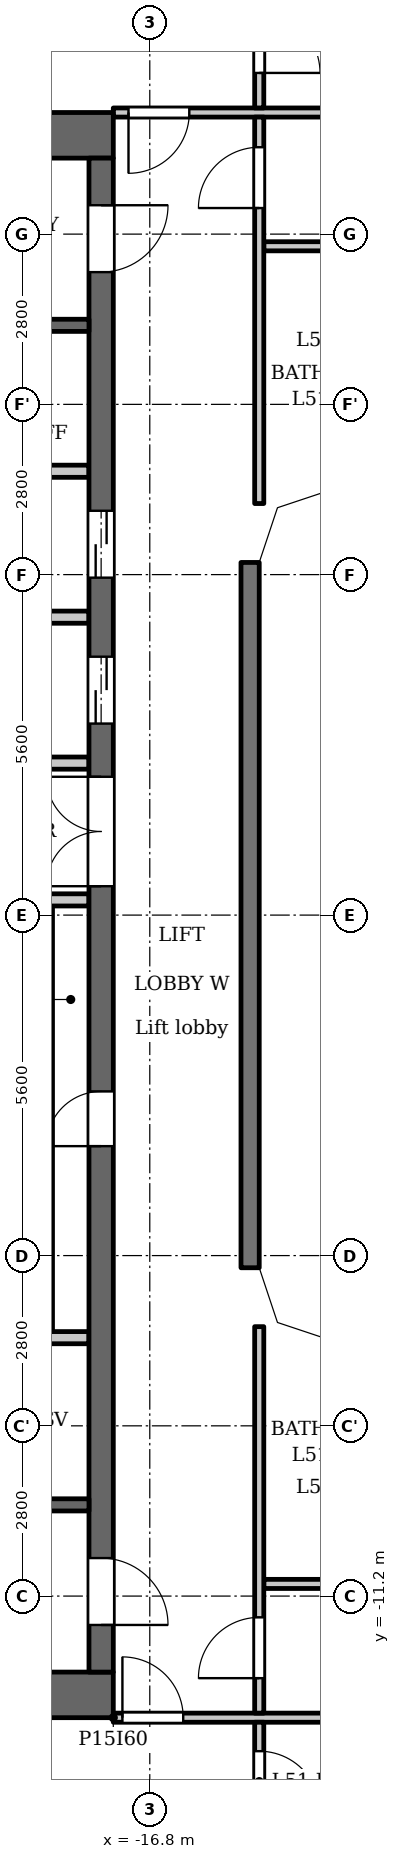
"""IFC4 building model, lengths in metres.
Left out: names, types, materials, properties, quantities, classifications, styles, units other than length and angle.
Written with IfcOpenShell. Run it as: python <this file> out.ifc"""

import sys

from ifc_helpers import new_model, si_unit, direction, frame, frame_2d, origin, place, context, subcontext, project, spatial, polyline, rectangle, outline, extrude, element, fill, save


model = new_model("IFC4")
c1 = context("Model", 3, precision=1e-05, world=origin(), true_north=direction((0.0, 1.0)))
c2 = subcontext(c1, "Body", "Model", "MODEL_VIEW")
j1 = project(units=[si_unit("LENGTHUNIT", "METRE"), si_unit("PLANEANGLEUNIT", "RADIAN")], contexts=[c1])
p1 = place(None, origin())
s1 = spatial("IfcSite", under=j1, at=p1, CompositionType="ELEMENT")
p2 = place(p1, origin())
s2 = spatial("IfcBuilding", under=s1, at=p2, CompositionType="ELEMENT")
p3 = place(p2, frame((0.0, 0.0, 199.4)))
s3 = spatial("IfcBuildingStorey", under=s2, at=p3, CompositionType="ELEMENT", Elevation=199.4)
p4 = place(p3, frame((-15.15, -5.8, 0.0), z_axis=(0.0, 0.0, 1.0), x_axis=(0.0, 1.0, 0.0)))
e1 = element("IfcWall", 1, at=p4, inside=s3, PredefinedType="SOLIDWALL", context=c2, shape_type="SweptSolid", body=[
    extrude(rectangle(XDim=11.6, YDim=0.3, at=frame_2d((5.8, 0.0))), origin(), (0.0, 0.0, 1.0), 3.2),
])
for number, where, z_axis, x_axis in (
    (2, (-17.4, 12.825, 0.0), (0.0, 0.0, 1.0), (-1.0, 0.0, 0.0)),
    (3, (-17.4, -12.825, 0.0), (0.0, 0.0, 1.0), (-1.0, 0.0, 0.0)),
):
    element("IfcWall", number, at=place(p3, frame(where, z_axis=z_axis, x_axis=x_axis)), inside=s3, PredefinedType="SHEAR", context=c2, shape_type="SweptSolid", body=[
        extrude(rectangle(XDim=7.6, YDim=0.75, at=frame_2d((3.8, 0.0))), origin(), (0.0, 0.0, 1.0), 3.2),
    ])
p5 = place(p3, frame((-17.6, -12.45, 0.0), z_axis=(0.0, 0.0, 1.0), x_axis=(0.0, 1.0, 0.0)))
e4 = element("IfcWall", 4, at=p5, inside=s3, PredefinedType="SHEAR", context=c2, shape_type="SweptSolid", body=[
    extrude(rectangle(XDim=24.9, YDim=0.4, at=frame_2d((12.45, 0.0))), origin(), (0.0, 0.0, 1.0), 3.2),
])
p6 = place(p5, frame((8.65, 0.0, 0.0)))
e5 = element("IfcOpeningElement", 5, at=p6, cuts=e4, PredefinedType="OPENING", context=c2, shape_type="SweptSolid", body=[
    extrude(rectangle(XDim=0.9, YDim=2.1, at=frame_2d((0.45, 1.05))), frame((0.0, 0.21, 0.0), z_axis=(0.0, -1.0, 0.0), x_axis=(1.0, 0.0, 0.0)), (0.0, 0.0, 1.0), 0.42),
])
p7 = place(p5, frame((15.6, 0.0, 0.0)))
e6 = element("IfcOpeningElement", 6, at=p7, cuts=e4, PredefinedType="OPENING", context=c2, shape_type="SweptSolid", body=[
    extrude(rectangle(XDim=1.1, YDim=2.1, at=frame_2d((0.55, 1.05))), frame((0.0, 0.21, 0.0), z_axis=(0.0, -1.0, 0.0), x_axis=(1.0, 0.0, 0.0)), (0.0, 0.0, 1.0), 0.42),
])
p8 = place(p5, frame((18.0, 0.0, 0.0)))
e7 = element("IfcOpeningElement", 7, at=p8, cuts=e4, PredefinedType="OPENING", context=c2, shape_type="SweptSolid", body=[
    extrude(rectangle(XDim=1.1, YDim=2.1, at=frame_2d((0.55, 1.05))), frame((0.0, 0.21, 0.0), z_axis=(0.0, -1.0, 0.0), x_axis=(1.0, 0.0, 0.0)), (0.0, 0.0, 1.0), 0.42),
])
p9 = place(p5, frame((23.025, 0.0, 0.0)))
e8 = element("IfcOpeningElement", 8, at=p9, cuts=e4, PredefinedType="OPENING", context=c2, shape_type="SweptSolid", body=[
    extrude(rectangle(XDim=1.1, YDim=2.1, at=frame_2d((0.55, 1.05))), frame((0.0, 0.21, 0.0), z_axis=(0.0, -1.0, 0.0), x_axis=(1.0, 0.0, 0.0)), (0.0, 0.0, 1.0), 0.42),
])
p10 = place(p5, frame((0.775, 0.0, 0.0)))
e9 = element("IfcOpeningElement", 9, at=p10, cuts=e4, PredefinedType="OPENING", context=c2, shape_type="SweptSolid", body=[
    extrude(rectangle(XDim=1.1, YDim=2.1, at=frame_2d((0.55, 1.05))), frame((0.0, 0.21, 0.0), z_axis=(0.0, -1.0, 0.0), x_axis=(1.0, 0.0, 0.0)), (0.0, 0.0, 1.0), 0.42),
])
p11 = place(p5, frame((12.925, 0.0, 0.0)))
e10 = element("IfcOpeningElement", 10, at=p11, cuts=e4, PredefinedType="OPENING", context=c2, shape_type="SweptSolid", body=[
    extrude(rectangle(XDim=1.8, YDim=2.1, at=frame_2d((0.9, 1.05))), frame((0.0, 0.21, 0.0), z_axis=(0.0, -1.0, 0.0), x_axis=(1.0, 0.0, 0.0)), (0.0, 0.0, 1.0), 0.42),
])
p12 = place(p3, frame((-17.8, -9.7, 0.0), z_axis=(0.0, 0.0, 1.0), x_axis=(-1.0, 0.0, 0.0)))
e11 = element("IfcWall", 11, at=p12, inside=s3, PredefinedType="SHEAR", context=c2, shape_type="SweptSolid", body=[
    extrude(rectangle(XDim=5.65, YDim=0.2, at=frame_2d((2.825, 0.0))), origin(), (0.0, 0.0, 1.0), 3.2),
])
p13 = place(p12, frame((0.85, 0.0, 0.0)))
e12 = element("IfcOpeningElement", 12, at=p13, cuts=e11, PredefinedType="OPENING", context=c2, shape_type="SweptSolid", body=[
    extrude(rectangle(XDim=1.1, YDim=2.1, at=frame_2d((0.55, 1.05))), frame((0.0, 0.11, 0.0), z_axis=(0.0, -1.0, 0.0), x_axis=(1.0, 0.0, 0.0)), (0.0, 0.0, 1.0), 0.22),
])
p14 = place(p12, frame((3.75, 0.0, 0.0)))
e13 = element("IfcOpeningElement", 13, at=p14, cuts=e11, PredefinedType="OPENING", context=c2, shape_type="SweptSolid", body=[
    extrude(rectangle(XDim=1.1, YDim=2.1, at=frame_2d((0.55, 1.05))), frame((0.0, 0.11, 0.0), z_axis=(0.0, -1.0, 0.0), x_axis=(1.0, 0.0, 0.0)), (0.0, 0.0, 1.0), 0.22),
])
p15 = place(p3, frame((-17.8, -6.95, 0.0), z_axis=(0.0, 0.0, 1.0), x_axis=(-1.0, 0.0, 0.0)))
e14 = element("IfcWall", 14, at=p15, inside=s3, PredefinedType="PARTITIONING", context=c2, shape_type="SweptSolid", body=[
    extrude(rectangle(XDim=2.8, YDim=0.2, at=frame_2d((1.4, 0.0))), origin(), (0.0, 0.0, 1.0), 3.2),
])
p16 = place(p3, frame((-17.8, 0.25, 0.0), z_axis=(0.0, 0.0, 1.0), x_axis=(-1.0, 0.0, 0.0)))
e15 = element("IfcWall", 15, at=p16, inside=s3, PredefinedType="PARTITIONING", context=c2, shape_type="SweptSolid", body=[
    extrude(rectangle(XDim=3.0, YDim=0.2, at=frame_2d((1.5, 0.0))), origin(), (0.0, 0.0, 1.0), 3.2),
])
p17 = place(p16, frame((1.35, 0.0, 0.0)))
e16 = element("IfcOpeningElement", 16, at=p17, cuts=e15, PredefinedType="OPENING", context=c2, shape_type="SweptSolid", body=[
    extrude(rectangle(XDim=0.9, YDim=2.1, at=frame_2d((0.45, 1.05))), frame((0.0, 0.11, 0.0), z_axis=(0.0, -1.0, 0.0), x_axis=(1.0, 0.0, 0.0)), (0.0, 0.0, 1.0), 0.22),
])
p18 = place(p3, frame((-17.8, 2.5, 0.0), z_axis=(0.0, 0.0, 1.0), x_axis=(-1.0, 0.0, 0.0)))
e17 = element("IfcWall", 17, at=p18, inside=s3, PredefinedType="PARTITIONING", context=c2, shape_type="SweptSolid", body=[
    extrude(rectangle(XDim=3.0, YDim=0.2, at=frame_2d((1.5, 0.0))), origin(), (0.0, 0.0, 1.0), 3.2),
])
for number, where, z_axis, x_axis in (
    (18, (-17.8, 4.9, 0.0), (0.0, 0.0, 1.0), (-1.0, 0.0, 0.0)),
    (19, (-17.8, 7.3, 0.0), (0.0, 0.0, 1.0), (-1.0, 0.0, 0.0)),
):
    element("IfcWall", number, at=place(p3, frame(where, z_axis=z_axis, x_axis=x_axis)), inside=s3, PredefinedType="PARTITIONING", context=c2, shape_type="SweptSolid", body=[
        extrude(rectangle(XDim=2.8, YDim=0.2, at=frame_2d((1.4, 0.0))), origin(), (0.0, 0.0, 1.0), 3.2),
    ])
p19 = place(p3, frame((-17.8, 9.7, 0.0), z_axis=(0.0, 0.0, 1.0), x_axis=(-1.0, 0.0, 0.0)))
e20 = element("IfcWall", 20, at=p19, inside=s3, PredefinedType="SHEAR", context=c2, shape_type="SweptSolid", body=[
    extrude(rectangle(XDim=5.65, YDim=0.2, at=frame_2d((2.825, 0.0))), origin(), (0.0, 0.0, 1.0), 3.2),
])
p20 = place(p19, frame((0.85, 0.0, 0.0)))
e21 = element("IfcOpeningElement", 21, at=p20, cuts=e20, PredefinedType="OPENING", context=c2, shape_type="SweptSolid", body=[
    extrude(rectangle(XDim=1.1, YDim=2.1, at=frame_2d((0.55, 1.05))), frame((0.0, 0.11, 0.0), z_axis=(0.0, -1.0, 0.0), x_axis=(1.0, 0.0, 0.0)), (0.0, 0.0, 1.0), 0.22),
])
p21 = place(p19, frame((3.75, 0.0, 0.0)))
e22 = element("IfcOpeningElement", 22, at=p21, cuts=e20, PredefinedType="OPENING", context=c2, shape_type="SweptSolid", body=[
    extrude(rectangle(XDim=1.1, YDim=2.1, at=frame_2d((0.55, 1.05))), frame((0.0, 0.11, 0.0), z_axis=(0.0, -1.0, 0.0), x_axis=(1.0, 0.0, 0.0)), (0.0, 0.0, 1.0), 0.22),
])
p22 = place(p3, frame((-17.4, -13.2, 0.0), z_axis=(0.0, 0.0, 1.0), x_axis=(1.0, 0.0, 0.0)))
e23 = element("IfcWall", 23, at=p22, inside=s3, PredefinedType="PARTITIONING", context=c2, shape_type="SweptSolid", body=[
    extrude(rectangle(XDim=34.8, YDim=0.15, at=frame_2d((17.4, 0.0))), origin(), (0.0, 0.0, 1.0), 3.2),
])
p23 = place(p22, frame((0.15, 0.0, 0.0)))
e24 = element("IfcOpeningElement", 24, at=p23, cuts=e23, PredefinedType="OPENING", context=c2, shape_type="SweptSolid", body=[
    extrude(rectangle(XDim=1.0, YDim=2.1, at=frame_2d((0.5, 1.05))), frame((0.0, 0.085, 0.0), z_axis=(0.0, -1.0, 0.0), x_axis=(1.0, 0.0, 0.0)), (0.0, 0.0, 1.0), 0.17),
])
p24 = place(p22, frame((33.55, 0.0, 0.0)))
e25 = element("IfcOpeningElement", 25, at=p24, cuts=e23, PredefinedType="OPENING", context=c2, shape_type="SweptSolid", body=[
    extrude(rectangle(XDim=1.0, YDim=2.1, at=frame_2d((0.5, 1.05))), frame((0.0, 0.085, 0.0), z_axis=(0.0, -1.0, 0.0), x_axis=(1.0, 0.0, 0.0)), (0.0, 0.0, 1.0), 0.17),
])
p25 = place(p3, frame((-14.925, -11.0, 0.0), z_axis=(0.0, 0.0, 1.0), x_axis=(1.0, 0.0, 0.0)))
e26 = element("IfcWall", 26, at=p25, inside=s3, PredefinedType="PARTITIONING", context=c2, shape_type="SweptSolid", body=[
    extrude(rectangle(XDim=29.85, YDim=0.15, at=frame_2d((14.925, 0.0))), origin(), (0.0, 0.0, 1.0), 3.2),
])
p26 = place(p25, frame((2.575, 0.0, 0.0)))
e27 = element("IfcOpeningElement", 27, at=p26, cuts=e26, PredefinedType="OPENING", context=c2, shape_type="SweptSolid", body=[
    extrude(rectangle(XDim=1.0, YDim=2.1, at=frame_2d((0.5, 1.05))), frame((0.0, 0.085, 0.0), z_axis=(0.0, -1.0, 0.0), x_axis=(1.0, 0.0, 0.0)), (0.0, 0.0, 1.0), 0.17),
])
p27 = place(p25, frame((26.375, 0.0, 0.0)))
e28 = element("IfcOpeningElement", 28, at=p27, cuts=e26, PredefinedType="OPENING", context=c2, shape_type="SweptSolid", body=[
    extrude(rectangle(XDim=1.0, YDim=2.1, at=frame_2d((0.5, 1.05))), frame((0.0, 0.085, 0.0), z_axis=(0.0, -1.0, 0.0), x_axis=(1.0, 0.0, 0.0)), (0.0, 0.0, 1.0), 0.17),
])
p28 = place(p3, frame((-14.925, 11.0, 0.0), z_axis=(0.0, 0.0, 1.0), x_axis=(1.0, 0.0, 0.0)))
e29 = element("IfcWall", 29, at=p28, inside=s3, PredefinedType="PARTITIONING", context=c2, shape_type="SweptSolid", body=[
    extrude(rectangle(XDim=29.85, YDim=0.15, at=frame_2d((14.925, 0.0))), origin(), (0.0, 0.0, 1.0), 3.2),
])
p29 = place(p28, frame((2.475, 0.0, 0.0)))
e30 = element("IfcOpeningElement", 30, at=p29, cuts=e29, PredefinedType="OPENING", context=c2, shape_type="SweptSolid", body=[
    extrude(rectangle(XDim=1.0, YDim=2.1, at=frame_2d((0.5, 1.05))), frame((0.0, 0.085, 0.0), z_axis=(0.0, -1.0, 0.0), x_axis=(1.0, 0.0, 0.0)), (0.0, 0.0, 1.0), 0.17),
])
p30 = place(p28, frame((17.975, 0.0, 0.0)))
e31 = element("IfcOpeningElement", 31, at=p30, cuts=e29, PredefinedType="OPENING", context=c2, shape_type="SweptSolid", body=[
    extrude(rectangle(XDim=1.0, YDim=2.1, at=frame_2d((0.5, 1.05))), frame((0.0, 0.085, 0.0), z_axis=(0.0, -1.0, 0.0), x_axis=(1.0, 0.0, 0.0)), (0.0, 0.0, 1.0), 0.17),
])
p31 = place(p3, frame((-17.4, 13.2, 0.0), z_axis=(0.0, 0.0, 1.0), x_axis=(1.0, 0.0, 0.0)))
e32 = element("IfcWall", 32, at=p31, inside=s3, PredefinedType="PARTITIONING", context=c2, shape_type="SweptSolid", body=[
    extrude(rectangle(XDim=34.8, YDim=0.15, at=frame_2d((17.4, 0.0))), origin(), (0.0, 0.0, 1.0), 3.2),
])
p32 = place(p31, frame((0.25, 0.0, 0.0)))
e33 = element("IfcOpeningElement", 33, at=p32, cuts=e32, PredefinedType="OPENING", context=c2, shape_type="SweptSolid", body=[
    extrude(rectangle(XDim=1.0, YDim=2.1, at=frame_2d((0.5, 1.05))), frame((0.0, 0.085, 0.0), z_axis=(0.0, -1.0, 0.0), x_axis=(1.0, 0.0, 0.0)), (0.0, 0.0, 1.0), 0.17),
])
p33 = place(p31, frame((33.65, 0.0, 0.0)))
e34 = element("IfcOpeningElement", 34, at=p33, cuts=e32, PredefinedType="OPENING", context=c2, shape_type="SweptSolid", body=[
    extrude(rectangle(XDim=1.0, YDim=2.1, at=frame_2d((0.5, 1.05))), frame((0.0, 0.085, 0.0), z_axis=(0.0, -1.0, 0.0), x_axis=(1.0, 0.0, 0.0)), (0.0, 0.0, 1.0), 0.17),
])
p34 = place(p3, frame((-15.0, -15.325, 0.0), z_axis=(0.0, 0.0, 1.0), x_axis=(0.0, 1.0, 0.0)))
e35 = element("IfcWall", 35, at=p34, inside=s3, PredefinedType="PARTITIONING", context=c2, shape_type="SweptSolid", body=[
    extrude(rectangle(XDim=2.05, YDim=0.15, at=frame_2d((1.025, 0.0))), origin(), (0.0, 0.0, 1.0), 3.2),
])
p35 = place(p34, frame((0.574, 0.0, 0.0)))
e36 = element("IfcOpeningElement", 36, at=p35, cuts=e35, PredefinedType="OPENING", context=c2, shape_type="SweptSolid", body=[
    extrude(rectangle(XDim=1.0, YDim=2.1, at=frame_2d((0.5, 1.05))), frame((0.0, 0.085, 0.0), z_axis=(0.0, -1.0, 0.0), x_axis=(1.0, 0.0, 0.0)), (0.0, 0.0, 1.0), 0.17),
])
p36 = place(p3, frame((-15.0, -13.125, 0.0), z_axis=(0.0, 0.0, 1.0), x_axis=(0.0, 1.0, 0.0)))
e37 = element("IfcWall", 37, at=p36, inside=s3, PredefinedType="PARTITIONING", context=c2, shape_type="SweptSolid", body=[
    extrude(rectangle(XDim=6.356, YDim=0.15, at=frame_2d((3.178, 0.0))), origin(), (0.0, 0.0, 1.0), 3.2),
])
p37 = place(p36, frame((0.575, 0.0, 0.0)))
e38 = element("IfcOpeningElement", 38, at=p37, cuts=e37, PredefinedType="OPENING", context=c2, shape_type="SweptSolid", body=[
    extrude(rectangle(XDim=1.0, YDim=2.1, at=frame_2d((0.5, 1.05))), frame((0.0, 0.085, 0.0), z_axis=(0.0, -1.0, 0.0), x_axis=(1.0, 0.0, 0.0)), (0.0, 0.0, 1.0), 0.17),
])
p38 = place(p3, frame((-15.0, 6.769, 0.0), z_axis=(0.0, 0.0, 1.0), x_axis=(0.0, 1.0, 0.0)))
e39 = element("IfcWall", 39, at=p38, inside=s3, PredefinedType="PARTITIONING", context=c2, shape_type="SweptSolid", body=[
    extrude(rectangle(XDim=6.356, YDim=0.15, at=frame_2d((3.178, 0.0))), origin(), (0.0, 0.0, 1.0), 3.2),
])
p39 = place(p38, frame((4.86, 0.0, 0.0)))
e40 = element("IfcOpeningElement", 40, at=p39, cuts=e39, PredefinedType="OPENING", context=c2, shape_type="SweptSolid", body=[
    extrude(rectangle(XDim=1.0, YDim=2.1, at=frame_2d((0.5, 1.05))), frame((0.0, 0.085, 0.0), z_axis=(0.0, -1.0, 0.0), x_axis=(1.0, 0.0, 0.0)), (0.0, 0.0, 1.0), 0.17),
])
p40 = place(p3, frame((-15.0, 13.275, 0.0), z_axis=(0.0, 0.0, 1.0), x_axis=(0.0, 1.0, 0.0)))
e41 = element("IfcWall", 41, at=p40, inside=s3, PredefinedType="PARTITIONING", context=c2, shape_type="SweptSolid", body=[
    extrude(rectangle(XDim=2.05, YDim=0.15, at=frame_2d((1.025, 0.0))), origin(), (0.0, 0.0, 1.0), 3.2),
])
p41 = place(p40, frame((0.576, 0.0, 0.0)))
e42 = element("IfcOpeningElement", 42, at=p41, cuts=e41, PredefinedType="OPENING", context=c2, shape_type="SweptSolid", body=[
    extrude(rectangle(XDim=1.0, YDim=2.1, at=frame_2d((0.5, 1.05))), frame((0.0, 0.085, 0.0), z_axis=(0.0, -1.0, 0.0), x_axis=(1.0, 0.0, 0.0)), (0.0, 0.0, 1.0), 0.17),
])
p42 = place(p3, origin())
e43 = element("IfcWall", 43, at=p42, inside=s3, PredefinedType="SOLIDWALL", context=c2, shape_type="SweptSolid", body=[
    extrude(outline(polyline([(-13.849, 7.3), (-14.937, 6.937), (-15.3, 5.849), (-15.3, 5.8), (-15.0, 5.8), (-14.7, 6.7), (-13.8, 7.0), (-13.8, 7.3), (-13.849, 7.3)])), origin(), (0.0, 0.0, 1.0), 3.2),
])
e44 = element("IfcWall", 44, at=p42, inside=s3, PredefinedType="SOLIDWALL", context=c2, shape_type="SweptSolid", body=[
    extrude(outline(polyline([(-14.937, -6.937), (-13.849, -7.3), (-13.8, -7.3), (-13.8, -7.0), (-14.7, -6.7), (-15.0, -5.8), (-15.3, -5.8), (-15.3, -5.849), (-14.937, -6.937)])), origin(), (0.0, 0.0, 1.0), 3.2),
])
p43 = place(p6, origin())
e45 = element("IfcDoor", 45, at=p43, inside=s3, OperationType="SINGLE_SWING_RIGHT", PredefinedType="DOOR", context=c2, shape_type="SweptSolid", body=[
    extrude(rectangle(XDim=0.9, YDim=2.1, at=frame_2d((0.45, 1.05))), frame((0.0, 0.025, 0.0), z_axis=(0.0, -1.0, 0.0), x_axis=(1.0, 0.0, 0.0)), (0.0, 0.0, 1.0), 0.05),
])
fill(e5, e45)
p44 = place(p7, origin())
e46 = element("IfcDoor", 46, at=p44, inside=s3, OperationType="DOUBLE_DOOR_SLIDING", PredefinedType="DOOR", context=c2, shape_type="SweptSolid", body=[
    extrude(rectangle(XDim=1.1, YDim=2.1, at=frame_2d((0.55, 1.05))), frame((0.0, 0.025, 0.0), z_axis=(0.0, -1.0, 0.0), x_axis=(1.0, 0.0, 0.0)), (0.0, 0.0, 1.0), 0.05),
])
fill(e6, e46)
p45 = place(p8, origin())
e47 = element("IfcDoor", 47, at=p45, inside=s3, OperationType="DOUBLE_DOOR_SLIDING", PredefinedType="DOOR", context=c2, shape_type="SweptSolid", body=[
    extrude(rectangle(XDim=1.1, YDim=2.1, at=frame_2d((0.55, 1.05))), frame((0.0, 0.025, 0.0), z_axis=(0.0, -1.0, 0.0), x_axis=(1.0, 0.0, 0.0)), (0.0, 0.0, 1.0), 0.05),
])
fill(e7, e47)
p46 = place(p9, origin())
e48 = element("IfcDoor", 48, at=p46, inside=s3, OperationType="SINGLE_SWING_RIGHT", PredefinedType="DOOR", context=c2, shape_type="SweptSolid", body=[
    extrude(rectangle(XDim=1.1, YDim=2.1, at=frame_2d((0.55, 1.05))), frame((0.0, 0.025, 0.0), z_axis=(0.0, -1.0, 0.0), x_axis=(1.0, 0.0, 0.0)), (0.0, 0.0, 1.0), 0.05),
])
fill(e8, e48)
p47 = place(p10, origin())
e49 = element("IfcDoor", 49, at=p47, inside=s3, OperationType="SINGLE_SWING_LEFT", PredefinedType="DOOR", context=c2, shape_type="SweptSolid", body=[
    extrude(rectangle(XDim=1.1, YDim=2.1, at=frame_2d((0.55, 1.05))), frame((0.0, 0.025, 0.0), z_axis=(0.0, -1.0, 0.0), x_axis=(1.0, 0.0, 0.0)), (0.0, 0.0, 1.0), 0.05),
])
fill(e9, e49)
p48 = place(p11, origin())
e50 = element("IfcDoor", 50, at=p48, inside=s3, OperationType="DOUBLE_DOOR_SINGLE_SWING", PredefinedType="DOOR", context=c2, shape_type="SweptSolid", body=[
    extrude(rectangle(XDim=1.8, YDim=2.1, at=frame_2d((0.9, 1.05))), frame((0.0, 0.025, 0.0), z_axis=(0.0, -1.0, 0.0), x_axis=(1.0, 0.0, 0.0)), (0.0, 0.0, 1.0), 0.05),
])
fill(e10, e50)
p49 = place(p39, origin())
e51 = element("IfcDoor", 51, at=p49, inside=s3, OperationType="SINGLE_SWING_RIGHT", PredefinedType="DOOR", context=c2, shape_type="SweptSolid", body=[
    extrude(rectangle(XDim=1.0, YDim=2.1, at=frame_2d((0.5, 1.05))), frame((0.0, 0.025, 0.0), z_axis=(0.0, -1.0, 0.0), x_axis=(1.0, 0.0, 0.0)), (0.0, 0.0, 1.0), 0.05),
])
fill(e40, e51)
p50 = place(p32, origin())
e52 = element("IfcDoor", 52, at=p50, inside=s3, OperationType="SINGLE_SWING_LEFT", PredefinedType="DOOR", context=c2, shape_type="SweptSolid", body=[
    extrude(rectangle(XDim=1.0, YDim=2.1, at=frame_2d((0.5, 1.05))), frame((0.0, 0.025, 0.0), z_axis=(0.0, -1.0, 0.0), x_axis=(1.0, 0.0, 0.0)), (0.0, 0.0, 1.0), 0.05),
])
fill(e33, e52)
p51 = place(p37, origin())
e53 = element("IfcDoor", 53, at=p51, inside=s3, OperationType="SINGLE_SWING_RIGHT", PredefinedType="DOOR", context=c2, shape_type="SweptSolid", body=[
    extrude(rectangle(XDim=1.0, YDim=2.1, at=frame_2d((0.5, 1.05))), frame((0.0, 0.025, 0.0), z_axis=(0.0, -1.0, 0.0), x_axis=(1.0, 0.0, 0.0)), (0.0, 0.0, 1.0), 0.05),
])
fill(e38, e53)
p52 = place(p23, origin())
e54 = element("IfcDoor", 54, at=p52, inside=s3, OperationType="SINGLE_SWING_RIGHT", PredefinedType="DOOR", context=c2, shape_type="SweptSolid", body=[
    extrude(rectangle(XDim=1.0, YDim=2.1, at=frame_2d((0.5, 1.05))), frame((0.0, 0.025, 0.0), z_axis=(0.0, -1.0, 0.0), x_axis=(1.0, 0.0, 0.0)), (0.0, 0.0, 1.0), 0.05),
])
fill(e24, e54)
p53 = place(p41, origin())
e55 = element("IfcDoor", 55, at=p53, inside=s3, OperationType="SINGLE_SWING_LEFT", PredefinedType="DOOR", context=c2, shape_type="SweptSolid", body=[
    extrude(rectangle(XDim=1.0, YDim=2.1, at=frame_2d((0.5, 1.05))), frame((0.0, 0.025, 0.0), z_axis=(0.0, -1.0, 0.0), x_axis=(1.0, 0.0, 0.0)), (0.0, 0.0, 1.0), 0.05),
])
fill(e42, e55)
p54 = place(p35, origin())
e56 = element("IfcDoor", 56, at=p54, inside=s3, OperationType="SINGLE_SWING_LEFT", PredefinedType="DOOR", context=c2, shape_type="SweptSolid", body=[
    extrude(rectangle(XDim=1.0, YDim=2.1, at=frame_2d((0.5, 1.05))), frame((0.0, 0.025, 0.0), z_axis=(0.0, -1.0, 0.0), x_axis=(1.0, 0.0, 0.0)), (0.0, 0.0, 1.0), 0.05),
])
fill(e36, e56)
save(model, sys.argv[1])
